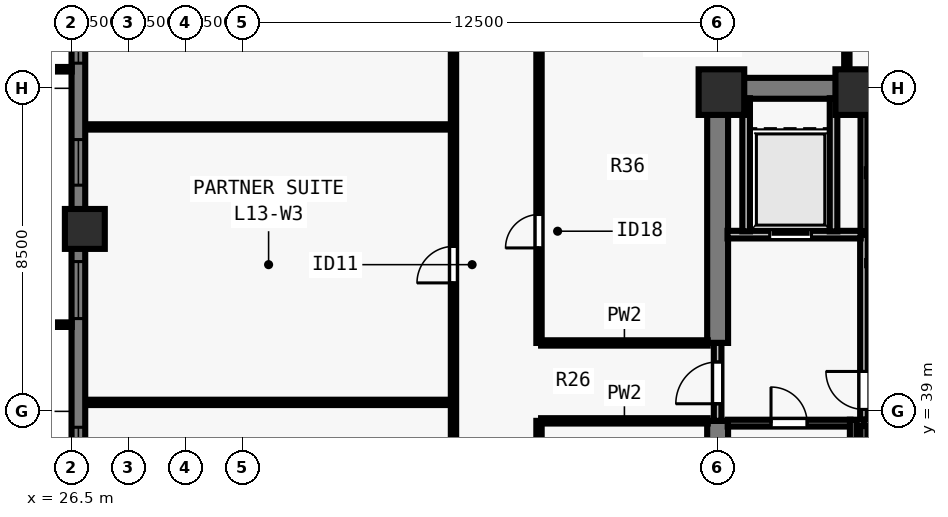
"""IFC4 building model, lengths in metres.
Left out: names, types, materials, properties, quantities, classifications, styles, units other than length and angle.
Written with IfcOpenShell. Run it as: python <this file> out.ifc"""

import sys

from ifc_helpers import new_model, si_unit, direction, frame, frame_2d, origin, origin_2d, place, context, subcontext, project, spatial, rectangle, extrude, element, fill, save


model = new_model("IFC4")
c1 = context("Model", 3, precision=1e-05, world=origin(), true_north=direction((0.0, 1.0)))
c2 = subcontext(c1, "Body", "Model", "MODEL_VIEW")
j1 = project(units=[si_unit("LENGTHUNIT", "METRE"), si_unit("PLANEANGLEUNIT", "RADIAN")], contexts=[c1])
p1 = place(None, origin())
s1 = spatial("IfcSite", under=j1, at=p1, CompositionType="ELEMENT")
p2 = place(p1, origin())
s2 = spatial("IfcBuilding", under=s1, at=p2, CompositionType="ELEMENT")
p3 = place(p2, frame((0.0, 0.0, 51.5)))
s3 = spatial("IfcBuildingStorey", under=s2, at=p3, CompositionType="ELEMENT", Elevation=51.5)
for number, where, z_axis, x_axis in (
    (1, (43.6, 47.4, 0.0), (0.0, 0.0, 1.0), (1.0, 0.0, 0.0)),
    (2, (47.2, 47.4, 0.0), (0.0, 0.0, 1.0), (1.0, 0.0, 0.0)),
):
    element("IfcColumn", number, at=place(p3, frame(where, z_axis=z_axis, x_axis=x_axis)), inside=s3, PredefinedType="COLUMN", context=c2, shape_type="SweptSolid", body=[
        extrude(rectangle(XDim=1.2, YDim=1.2, at=origin_2d()), origin(), (0.0, 0.0, 1.0), 3.5),
    ])
p4 = place(p3, frame((26.85, 43.8, 0.0), z_axis=(0.0, 0.0, 1.0), x_axis=(0.0, 1.0, 0.0)))
e3 = element("IfcColumn", 3, at=p4, inside=s3, PredefinedType="COLUMN", context=c2, shape_type="SweptSolid", body=[
    extrude(rectangle(XDim=1.05, YDim=1.05, at=origin_2d()), origin(), (0.0, 0.0, 1.0), 3.5),
])
p5 = place(p3, frame((26.68, 16.5, 0.0), z_axis=(0.0, 0.0, 1.0), x_axis=(0.0, 1.0, 0.0)))
e4 = element("IfcWall", 4, at=p5, inside=s3, PredefinedType="SOLIDWALL", context=c2, shape_type="SweptSolid", body=[
    extrude(rectangle(XDim=44.662, YDim=0.36, at=frame_2d((22.331, 0.0))), origin(), (0.0, 0.0, 1.0), 3.28),
])
p6 = place(p5, frame((4.78, 0.0, 0.8)))
e5 = element("IfcOpeningElement", 5, at=p6, cuts=e4, PredefinedType="OPENING", context=c2, shape_type="SweptSolid", body=[
    extrude(rectangle(XDim=1.5, YDim=1.544, at=frame_2d((0.75, 0.772))), frame((0.0, 0.19, 0.0), z_axis=(0.0, -1.0, 0.0), x_axis=(1.0, 0.0, 0.0)), (0.0, 0.0, 1.0), 0.38),
])
p7 = place(p5, frame((8.29, 0.0, 0.8)))
e6 = element("IfcOpeningElement", 6, at=p7, cuts=e4, PredefinedType="OPENING", context=c2, shape_type="SweptSolid", body=[
    extrude(rectangle(XDim=1.2, YDim=1.544, at=frame_2d((0.6, 0.772))), frame((0.0, 0.19, 0.0), z_axis=(0.0, -1.0, 0.0), x_axis=(1.0, 0.0, 0.0)), (0.0, 0.0, 1.0), 0.38),
])
p8 = place(p5, frame((11.5, 0.0, 0.8)))
e7 = element("IfcOpeningElement", 7, at=p8, cuts=e4, PredefinedType="OPENING", context=c2, shape_type="SweptSolid", body=[
    extrude(rectangle(XDim=1.5, YDim=1.544, at=frame_2d((0.75, 0.772))), frame((0.0, 0.19, 0.0), z_axis=(0.0, -1.0, 0.0), x_axis=(1.0, 0.0, 0.0)), (0.0, 0.0, 1.0), 0.38),
])
p9 = place(p5, frame((15.01, 0.0, 0.8)))
e8 = element("IfcOpeningElement", 8, at=p9, cuts=e4, PredefinedType="OPENING", context=c2, shape_type="SweptSolid", body=[
    extrude(rectangle(XDim=1.2, YDim=1.544, at=frame_2d((0.6, 0.772))), frame((0.0, 0.19, 0.0), z_axis=(0.0, -1.0, 0.0), x_axis=(1.0, 0.0, 0.0)), (0.0, 0.0, 1.0), 0.38),
])
p10 = place(p5, frame((18.671, 0.0, 0.8)))
e9 = element("IfcOpeningElement", 9, at=p10, cuts=e4, PredefinedType="OPENING", context=c2, shape_type="SweptSolid", body=[
    extrude(rectangle(XDim=1.5, YDim=1.544, at=frame_2d((0.75, 0.772))), frame((0.0, 0.19, 0.0), z_axis=(0.0, -1.0, 0.0), x_axis=(1.0, 0.0, 0.0)), (0.0, 0.0, 1.0), 0.38),
])
p11 = place(p5, frame((20.881, 0.0, 0.8)))
e10 = element("IfcOpeningElement", 10, at=p11, cuts=e4, PredefinedType="OPENING", context=c2, shape_type="SweptSolid", body=[
    extrude(rectangle(XDim=1.2, YDim=1.544, at=frame_2d((0.6, 0.772))), frame((0.0, 0.19, 0.0), z_axis=(0.0, -1.0, 0.0), x_axis=(1.0, 0.0, 0.0)), (0.0, 0.0, 1.0), 0.38),
])
p12 = place(p5, frame((24.941, 0.0, 0.8)))
e11 = element("IfcOpeningElement", 11, at=p12, cuts=e4, PredefinedType="OPENING", context=c2, shape_type="SweptSolid", body=[
    extrude(rectangle(XDim=1.5, YDim=1.544, at=frame_2d((0.75, 0.772))), frame((0.0, 0.19, 0.0), z_axis=(0.0, -1.0, 0.0), x_axis=(1.0, 0.0, 0.0)), (0.0, 0.0, 1.0), 0.38),
])
p13 = place(p5, frame((28.451, 0.0, 0.8)))
e12 = element("IfcOpeningElement", 12, at=p13, cuts=e4, PredefinedType="OPENING", context=c2, shape_type="SweptSolid", body=[
    extrude(rectangle(XDim=1.2, YDim=1.544, at=frame_2d((0.6, 0.772))), frame((0.0, 0.19, 0.0), z_axis=(0.0, -1.0, 0.0), x_axis=(1.0, 0.0, 0.0)), (0.0, 0.0, 1.0), 0.38),
])
p14 = place(p5, frame((31.662, 0.0, 0.8)))
e13 = element("IfcOpeningElement", 13, at=p14, cuts=e4, PredefinedType="OPENING", context=c2, shape_type="SweptSolid", body=[
    extrude(rectangle(XDim=1.5, YDim=1.544, at=frame_2d((0.75, 0.772))), frame((0.0, 0.19, 0.0), z_axis=(0.0, -1.0, 0.0), x_axis=(1.0, 0.0, 0.0)), (0.0, 0.0, 1.0), 0.38),
])
p15 = place(p5, frame((35.172, 0.0, 0.8)))
e14 = element("IfcOpeningElement", 14, at=p15, cuts=e4, PredefinedType="OPENING", context=c2, shape_type="SweptSolid", body=[
    extrude(rectangle(XDim=1.2, YDim=1.544, at=frame_2d((0.6, 0.772))), frame((0.0, 0.19, 0.0), z_axis=(0.0, -1.0, 0.0), x_axis=(1.0, 0.0, 0.0)), (0.0, 0.0, 1.0), 0.38),
])
p16 = place(p5, frame((38.382, 0.0, 0.8)))
e15 = element("IfcOpeningElement", 15, at=p16, cuts=e4, PredefinedType="OPENING", context=c2, shape_type="SweptSolid", body=[
    extrude(rectangle(XDim=1.5, YDim=1.544, at=frame_2d((0.75, 0.772))), frame((0.0, 0.19, 0.0), z_axis=(0.0, -1.0, 0.0), x_axis=(1.0, 0.0, 0.0)), (0.0, 0.0, 1.0), 0.38),
])
p17 = place(p3, frame((43.225, 47.5, 0.0), z_axis=(0.0, 0.0, 1.0), x_axis=(1.0, 0.0, 0.0)))
e16 = element("IfcWall", 16, at=p17, inside=s3, PredefinedType="SHEAR", context=c2, shape_type="SweptSolid", body=[
    extrude(rectangle(XDim=17.55, YDim=0.55, at=frame_2d((8.775, 0.0))), origin(), (0.0, 0.0, 1.0), 3.28),
])
p18 = place(p3, frame((43.5, 30.765, 0.0), z_axis=(0.0, 0.0, 1.0), x_axis=(0.0, 1.0, 0.0)))
e17 = element("IfcWall", 17, at=p18, inside=s3, PredefinedType="SHEAR", context=c2, shape_type="SweptSolid", body=[
    extrude(rectangle(XDim=7.985, YDim=0.55, at=frame_2d((3.993, 0.0))), origin(), (0.0, 0.0, 1.0), 3.28),
])
p19 = place(p3, frame((43.5, 40.8, 0.0), z_axis=(0.0, 0.0, 1.0), x_axis=(0.0, 1.0, 0.0)))
e18 = element("IfcWall", 18, at=p19, inside=s3, PredefinedType="SHEAR", context=c2, shape_type="SweptSolid", body=[
    extrude(rectangle(XDim=6.435, YDim=0.55, at=frame_2d((3.218, 0.0))), origin(), (0.0, 0.0, 1.0), 3.28),
])
for number, where, z_axis, x_axis in (
    (19, (47.35, 38.7, 0.0), (0.0, 0.0, 1.0), (1.0, 0.0, 0.0)),
    (20, (47.35, 40.5, 0.0), (0.0, 0.0, 1.0), (1.0, 0.0, 0.0)),
):
    element("IfcWall", number, at=place(p3, frame(where, z_axis=z_axis, x_axis=x_axis)), inside=s3, PredefinedType="SOLIDWALL", context=c2, shape_type="SweptSolid", body=[
        extrude(rectangle(XDim=2.95, YDim=0.2, at=frame_2d((1.475, 0.0))), origin(), (0.0, 0.0, 1.0), 3.28),
    ])
p20 = place(p3, frame((43.5, 38.75, 0.0), z_axis=(0.0, 0.0, 1.0), x_axis=(0.0, 1.0, 0.0)))
e21 = element("IfcWall", 21, at=p20, inside=s3, PredefinedType="SOLIDWALL", context=c2, shape_type="SweptSolid", body=[
    extrude(rectangle(XDim=2.05, YDim=0.2, at=frame_2d((1.025, 0.0))), origin(), (0.0, 0.0, 1.0), 3.28),
])
p21 = place(p20, frame((0.45, 0.0, 0.0)))
e22 = element("IfcOpeningElement", 22, at=p21, cuts=e21, PredefinedType="OPENING", context=c2, shape_type="SweptSolid", body=[
    extrude(rectangle(XDim=1.1, YDim=2.15, at=frame_2d((0.55, 1.075))), frame((0.0, 0.11, 0.0), z_axis=(0.0, -1.0, 0.0), x_axis=(1.0, 0.0, 0.0)), (0.0, 0.0, 1.0), 0.22),
])
p22 = place(p3, frame((47.35, 38.785, 0.0), z_axis=(0.0, 0.0, 1.0), x_axis=(0.0, 1.0, 0.0)))
e23 = element("IfcWall", 23, at=p22, inside=s3, PredefinedType="SOLIDWALL", context=c2, shape_type="SweptSolid", body=[
    extrude(rectangle(XDim=4.865, YDim=0.2, at=frame_2d((2.433, 0.0))), origin(), (0.0, 0.0, 1.0), 3.28),
])
p23 = place(p22, frame((0.265, 0.0, 0.0)))
e24 = element("IfcOpeningElement", 24, at=p23, cuts=e23, PredefinedType="OPENING", context=c2, shape_type="SweptSolid", body=[
    extrude(rectangle(XDim=1.0, YDim=2.15, at=frame_2d((0.5, 1.075))), frame((0.0, 0.11, 0.0), z_axis=(0.0, -1.0, 0.0), x_axis=(1.0, 0.0, 0.0)), (0.0, 0.0, 1.0), 0.22),
])
p24 = place(p3, frame((43.76, 43.65, 0.0), z_axis=(0.0, 0.0, 1.0), x_axis=(1.0, 0.0, 0.0)))
e25 = element("IfcWall", 25, at=p24, inside=s3, PredefinedType="SOLIDWALL", context=c2, shape_type="SweptSolid", body=[
    extrude(rectangle(XDim=3.505, YDim=0.2, at=frame_2d((1.752, 0.0))), origin(), (0.0, 0.0, 1.0), 3.28),
])
p25 = place(p24, frame((1.11, 0.0, 0.0)))
e26 = element("IfcOpeningElement", 26, at=p25, cuts=e25, PredefinedType="OPENING", context=c2, shape_type="SweptSolid", body=[
    extrude(rectangle(XDim=1.1, YDim=2.2, at=frame_2d((0.55, 1.1))), frame((0.0, 0.11, 0.0), z_axis=(0.0, -1.0, 0.0), x_axis=(1.0, 0.0, 0.0)), (0.0, 0.0, 1.0), 0.22),
])
for number, where, z_axis, x_axis in (
    (27, (46.55, 43.735, 0.0), (0.0, 0.0, 1.0), (0.0, 1.0, 0.0)),
    (28, (44.25, 43.735, 0.0), (0.0, 0.0, 1.0), (0.0, 1.0, 0.0)),
):
    element("IfcWall", number, at=place(p3, frame(where, z_axis=z_axis, x_axis=x_axis)), inside=s3, PredefinedType="SOLIDWALL", context=c2, shape_type="SweptSolid", body=[
        extrude(rectangle(XDim=3.505, YDim=0.2, at=frame_2d((1.752, 0.0))), origin(), (0.0, 0.0, 1.0), 3.28),
    ])
p26 = place(p3, frame((47.35, 30.76, 0.0), z_axis=(0.0, 0.0, 1.0), x_axis=(0.0, 1.0, 0.0)))
e29 = element("IfcWall", 29, at=p26, inside=s3, PredefinedType="SOLIDWALL", context=c2, shape_type="SweptSolid", body=[
    extrude(rectangle(XDim=7.855, YDim=0.18, at=frame_2d((3.927, 0.0))), origin(), (0.0, 0.0, 1.0), 3.28),
])
p27 = place(p3, frame((47.35, 43.735, 0.0), z_axis=(0.0, 0.0, 1.0), x_axis=(0.0, 1.0, 0.0)))
e30 = element("IfcWall", 30, at=p27, inside=s3, PredefinedType="SOLIDWALL", context=c2, shape_type="SweptSolid", body=[
    extrude(rectangle(XDim=3.505, YDim=0.18, at=frame_2d((1.752, 0.0))), origin(), (0.0, 0.0, 1.0), 3.28),
])
p28 = place(p3, frame((47.435, 42.9, 0.0), z_axis=(0.0, 0.0, 1.0), x_axis=(1.0, 0.0, 0.0)))
e31 = element("IfcWall", 31, at=p28, inside=s3, PredefinedType="PARTITIONING", context=c2, shape_type="SweptSolid", body=[
    extrude(rectangle(XDim=2.78, YDim=0.11, at=frame_2d((1.39, 0.0))), origin(), (0.0, 0.0, 1.0), 3.28),
])
p29 = place(p3, frame((47.425, 45.28, 0.0), z_axis=(0.0, 0.0, 1.0), x_axis=(1.0, 0.0, 0.0)))
e32 = element("IfcWall", 32, at=p29, inside=s3, PredefinedType="SOLIDWALL", context=c2, shape_type="SweptSolid", body=[
    extrude(rectangle(XDim=2.79, YDim=0.18, at=frame_2d((1.395, 0.0))), origin(), (0.0, 0.0, 1.0), 3.28),
])
p30 = place(p3, frame((36.55, 23.305, 0.0), z_axis=(0.0, 0.0, 1.0), x_axis=(0.0, 1.0, 0.0)))
e33 = element("IfcWall", 33, at=p30, inside=s3, PredefinedType="PARTITIONING", context=c2, shape_type="SweptSolid", body=[
    extrude(rectangle(XDim=31.39, YDim=0.14, at=frame_2d((15.695, 0.0))), origin(), (0.0, 0.0, 1.0), 3.28),
])
p31 = place(p30, frame((3.307, 0.0, 0.0)))
e34 = element("IfcOpeningElement", 34, at=p31, cuts=e33, PredefinedType="OPENING", context=c2, shape_type="SweptSolid", body=[
    extrude(rectangle(XDim=0.96, YDim=2.12, at=frame_2d((0.48, 1.06))), frame((0.0, 0.08, 0.0), z_axis=(0.0, -1.0, 0.0), x_axis=(1.0, 0.0, 0.0)), (0.0, 0.0, 1.0), 0.16),
])
p32 = place(p30, frame((11.25, 0.0, 0.0)))
e35 = element("IfcOpeningElement", 35, at=p32, cuts=e33, PredefinedType="OPENING", context=c2, shape_type="SweptSolid", body=[
    extrude(rectangle(XDim=0.96, YDim=2.12, at=frame_2d((0.48, 1.06))), frame((0.0, 0.08, 0.0), z_axis=(0.0, -1.0, 0.0), x_axis=(1.0, 0.0, 0.0)), (0.0, 0.0, 1.0), 0.16),
])
p33 = place(p30, frame((19.075, 0.0, 0.0)))
e36 = element("IfcOpeningElement", 36, at=p33, cuts=e33, PredefinedType="OPENING", context=c2, shape_type="SweptSolid", body=[
    extrude(rectangle(XDim=0.96, YDim=2.12, at=frame_2d((0.48, 1.06))), frame((0.0, 0.08, 0.0), z_axis=(0.0, -1.0, 0.0), x_axis=(1.0, 0.0, 0.0)), (0.0, 0.0, 1.0), 0.16),
])
p34 = place(p30, frame((26.782, 0.0, 0.0)))
e37 = element("IfcOpeningElement", 37, at=p34, cuts=e33, PredefinedType="OPENING", context=c2, shape_type="SweptSolid", body=[
    extrude(rectangle(XDim=0.96, YDim=2.12, at=frame_2d((0.48, 1.06))), frame((0.0, 0.08, 0.0), z_axis=(0.0, -1.0, 0.0), x_axis=(1.0, 0.0, 0.0)), (0.0, 0.0, 1.0), 0.16),
])
p35 = place(p3, frame((38.8, 25.555, 0.0), z_axis=(0.0, 0.0, 1.0), x_axis=(0.0, 1.0, 0.0)))
e38 = element("IfcWall", 38, at=p35, inside=s3, PredefinedType="PARTITIONING", context=c2, shape_type="SweptSolid", body=[
    extrude(rectangle(XDim=13.195, YDim=0.14, at=frame_2d((6.598, 0.0))), origin(), (0.0, 0.0, 1.0), 3.28),
])
p36 = place(p35, frame((1.045, 0.0, 0.0)))
e39 = element("IfcOpeningElement", 39, at=p36, cuts=e38, PredefinedType="OPENING", context=c2, shape_type="SweptSolid", body=[
    extrude(rectangle(XDim=0.88, YDim=2.1, at=frame_2d((0.44, 1.05))), frame((0.0, 0.08, 0.0), z_axis=(0.0, -1.0, 0.0), x_axis=(1.0, 0.0, 0.0)), (0.0, 0.0, 1.0), 0.16),
])
p37 = place(p35, frame((10.245, 0.0, 0.0)))
e40 = element("IfcOpeningElement", 40, at=p37, cuts=e38, PredefinedType="OPENING", context=c2, shape_type="SweptSolid", body=[
    extrude(rectangle(XDim=0.88, YDim=2.1, at=frame_2d((0.44, 1.05))), frame((0.0, 0.08, 0.0), z_axis=(0.0, -1.0, 0.0), x_axis=(1.0, 0.0, 0.0)), (0.0, 0.0, 1.0), 0.16),
])
p38 = place(p3, frame((38.8, 40.8, 0.0), z_axis=(0.0, 0.0, 1.0), x_axis=(0.0, 1.0, 0.0)))
e41 = element("IfcWall", 41, at=p38, inside=s3, PredefinedType="PARTITIONING", context=c2, shape_type="SweptSolid", body=[
    extrude(rectangle(XDim=11.645, YDim=0.14, at=frame_2d((5.823, 0.0))), origin(), (0.0, 0.0, 1.0), 3.28),
])
p39 = place(p38, frame((2.5, 0.0, 0.0)))
e42 = element("IfcOpeningElement", 42, at=p39, cuts=e41, PredefinedType="OPENING", context=c2, shape_type="SweptSolid", body=[
    extrude(rectangle(XDim=0.88, YDim=2.1, at=frame_2d((0.44, 1.05))), frame((0.0, 0.08, 0.0), z_axis=(0.0, -1.0, 0.0), x_axis=(1.0, 0.0, 0.0)), (0.0, 0.0, 1.0), 0.16),
])
for number, where, z_axis, x_axis in (
    (43, (38.855, 38.75, 0.0), (0.0, 0.0, 1.0), (1.0, 0.0, 0.0)),
    (44, (38.855, 40.8, 0.0), (0.0, 0.0, 1.0), (1.0, 0.0, 0.0)),
):
    element("IfcWall", number, at=place(p3, frame(where, z_axis=z_axis, x_axis=x_axis)), inside=s3, PredefinedType="PARTITIONING", context=c2, shape_type="SweptSolid", body=[
        extrude(rectangle(XDim=4.385, YDim=0.14, at=frame_2d((2.192, 0.0))), origin(), (0.0, 0.0, 1.0), 3.28),
    ])
p40 = place(p3, frame((46.9, 47.76, 0.0), z_axis=(0.0, 0.0, 1.0), x_axis=(0.0, 1.0, 0.0)))
e45 = element("IfcWall", 45, at=p40, inside=s3, PredefinedType="PARTITIONING", context=c2, shape_type="SweptSolid", body=[
    extrude(rectangle(XDim=4.685, YDim=0.14, at=frame_2d((2.343, 0.0))), origin(), (0.0, 0.0, 1.0), 3.28),
])
p41 = place(p3, frame((26.92, 39.236, 0.0), z_axis=(0.0, 0.0, 1.0), x_axis=(1.0, 0.0, 0.0)))
e46 = element("IfcWall", 46, at=p41, inside=s3, PredefinedType="PARTITIONING", context=c2, shape_type="SweptSolid", body=[
    extrude(rectangle(XDim=9.53, YDim=0.14, at=frame_2d((4.765, 0.0))), origin(), (0.0, 0.0, 1.0), 2.849),
])
p42 = place(p3, frame((26.92, 46.484, 0.0), z_axis=(0.0, 0.0, 1.0), x_axis=(1.0, 0.0, 0.0)))
e47 = element("IfcWall", 47, at=p42, inside=s3, PredefinedType="PARTITIONING", context=c2, shape_type="SweptSolid", body=[
    extrude(rectangle(XDim=9.53, YDim=0.14, at=frame_2d((4.765, 0.0))), origin(), (0.0, 0.0, 1.0), 3.28),
])
p43 = place(p3, frame((43.765, 38.69, 0.0), z_axis=(0.0, 0.0, 1.0), x_axis=(1.0, 0.0, 0.0)))
e48 = element("IfcWall", 48, at=p43, inside=s3, PredefinedType="SOLIDWALL", context=c2, shape_type="SweptSolid", body=[
    extrude(rectangle(XDim=3.23, YDim=0.18, at=frame_2d((1.615, 0.0))), origin(), (0.0, 0.0, 1.0), 3.28),
])
p44 = place(p43, frame((1.14, 0.0, 0.0)))
e49 = element("IfcOpeningElement", 49, at=p44, cuts=e48, PredefinedType="OPENING", context=c2, shape_type="SweptSolid", body=[
    extrude(rectangle(XDim=0.95, YDim=2.15, at=frame_2d((0.475, 1.075))), frame((0.0, 0.1, 0.0), z_axis=(0.0, -1.0, 0.0), x_axis=(1.0, 0.0, 0.0)), (0.0, 0.0, 1.0), 0.2),
])
p45 = place(p3, frame((47.07, 38.78, 0.0), z_axis=(0.0, 0.0, 1.0), x_axis=(0.0, -1.0, 0.0)))
e50 = element("IfcWall", 50, at=p45, inside=s3, PredefinedType="SOLIDWALL", context=c2, shape_type="SweptSolid", body=[
    extrude(rectangle(XDim=8.017, YDim=0.18, at=frame_2d((4.009, 0.0))), origin(), (0.0, 0.0, 1.0), 3.28),
])
p46 = place(p11, origin())
e51 = element("IfcWindow", 51, at=p46, inside=s3, PartitioningType="SINGLE_PANEL", PredefinedType="WINDOW", context=c2, shape_type="SweptSolid", body=[
    extrude(rectangle(XDim=1.2, YDim=1.544, at=frame_2d((0.6, 0.772))), frame((0.0, -0.05, 0.0), z_axis=(0.0, -1.0, 0.0), x_axis=(1.0, 0.0, 0.0)), (0.0, 0.0, 1.0), 0.06),
])
fill(e10, e51)
p47 = place(p12, origin())
e52 = element("IfcWindow", 52, at=p47, inside=s3, PartitioningType="SINGLE_PANEL", PredefinedType="WINDOW", context=c2, shape_type="SweptSolid", body=[
    extrude(rectangle(XDim=1.5, YDim=1.544, at=frame_2d((0.75, 0.772))), frame((0.0, -0.05, 0.0), z_axis=(0.0, -1.0, 0.0), x_axis=(1.0, 0.0, 0.0)), (0.0, 0.0, 1.0), 0.06),
])
fill(e11, e52)
p48 = place(p13, origin())
e53 = element("IfcWindow", 53, at=p48, inside=s3, PartitioningType="SINGLE_PANEL", PredefinedType="WINDOW", context=c2, shape_type="SweptSolid", body=[
    extrude(rectangle(XDim=1.2, YDim=1.544, at=frame_2d((0.6, 0.772))), frame((0.0, -0.05, 0.0), z_axis=(0.0, -1.0, 0.0), x_axis=(1.0, 0.0, 0.0)), (0.0, 0.0, 1.0), 0.06),
])
fill(e12, e53)
p49 = place(p14, origin())
e54 = element("IfcWindow", 54, at=p49, inside=s3, PartitioningType="SINGLE_PANEL", PredefinedType="WINDOW", context=c2, shape_type="SweptSolid", body=[
    extrude(rectangle(XDim=1.5, YDim=1.544, at=frame_2d((0.75, 0.772))), frame((0.0, -0.05, 0.0), z_axis=(0.0, -1.0, 0.0), x_axis=(1.0, 0.0, 0.0)), (0.0, 0.0, 1.0), 0.06),
])
fill(e13, e54)
p50 = place(p21, origin())
e55 = element("IfcDoor", 55, at=p50, inside=s3, OperationType="SINGLE_SWING_LEFT", PredefinedType="DOOR", context=c2, shape_type="SweptSolid", body=[
    extrude(rectangle(XDim=1.1, YDim=2.15, at=frame_2d((0.55, 1.075))), frame((0.0, 0.025, 0.0), z_axis=(0.0, -1.0, 0.0), x_axis=(1.0, 0.0, 0.0)), (0.0, 0.0, 1.0), 0.05),
])
fill(e22, e55)
p51 = place(p23, origin())
e56 = element("IfcDoor", 56, at=p51, inside=s3, OperationType="SINGLE_SWING_RIGHT", PredefinedType="DOOR", context=c2, shape_type="SweptSolid", body=[
    extrude(rectangle(XDim=1.0, YDim=2.15, at=frame_2d((0.5, 1.075))), frame((0.0, 0.025, 0.0), z_axis=(0.0, -1.0, 0.0), x_axis=(1.0, 0.0, 0.0)), (0.0, 0.0, 1.0), 0.05),
])
fill(e24, e56)
p52 = place(p25, origin())
e57 = element("IfcDoor", 57, at=p52, inside=s3, OperationType="SLIDING_TO_LEFT", PredefinedType="DOOR", context=c2, shape_type="SweptSolid", body=[
    extrude(rectangle(XDim=1.1, YDim=2.2, at=frame_2d((0.55, 1.1))), frame((0.0, 0.025, 0.0), z_axis=(0.0, -1.0, 0.0), x_axis=(1.0, 0.0, 0.0)), (0.0, 0.0, 1.0), 0.05),
])
fill(e26, e57)
p53 = place(p39, origin())
e58 = element("IfcDoor", 58, at=p53, inside=s3, OperationType="SINGLE_SWING_LEFT", PredefinedType="DOOR", context=c2, shape_type="SweptSolid", body=[
    extrude(rectangle(XDim=0.88, YDim=2.1, at=frame_2d((0.44, 1.05))), frame((0.0, 0.025, 0.0), z_axis=(0.0, -1.0, 0.0), x_axis=(1.0, 0.0, 0.0)), (0.0, 0.0, 1.0), 0.05),
])
fill(e42, e58)
p54 = place(p33, origin())
e59 = element("IfcDoor", 59, at=p54, inside=s3, OperationType="SINGLE_SWING_LEFT", PredefinedType="DOOR", context=c2, shape_type="SweptSolid", body=[
    extrude(rectangle(XDim=0.96, YDim=2.12, at=frame_2d((0.48, 1.06))), frame((0.0, 0.025, 0.0), z_axis=(0.0, -1.0, 0.0), x_axis=(1.0, 0.0, 0.0)), (0.0, 0.0, 1.0), 0.05),
])
fill(e36, e59)
p55 = place(p44, origin())
e60 = element("IfcDoor", 60, at=p55, inside=s3, OperationType="SINGLE_SWING_LEFT", PredefinedType="DOOR", context=c2, shape_type="SweptSolid", body=[
    extrude(rectangle(XDim=0.95, YDim=2.15, at=frame_2d((0.475, 1.075))), frame((0.0, 0.025, 0.0), z_axis=(0.0, -1.0, 0.0), x_axis=(1.0, 0.0, 0.0)), (0.0, 0.0, 1.0), 0.05),
])
fill(e49, e60)
save(model, sys.argv[1])
